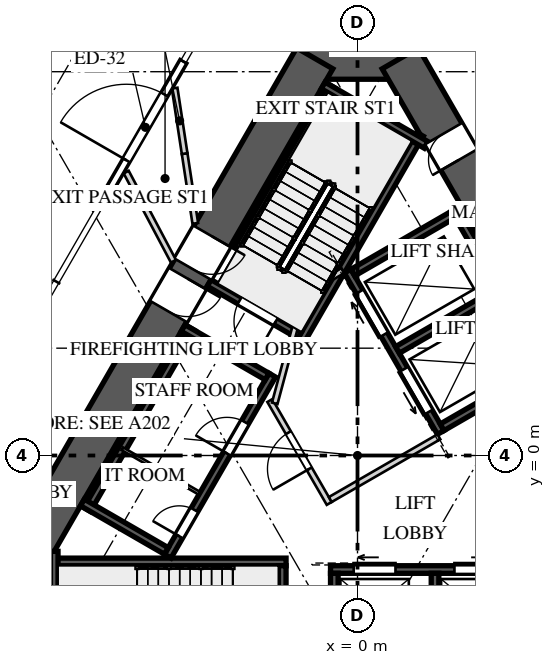
"""IFC4 building model, lengths in metres.
Left out: names, types, materials, properties, quantities, classifications, styles, units other than length and angle.
Written with IfcOpenShell. Run it as: python <this file> out.ifc"""

import sys

from ifc_helpers import new_model, si_unit, direction, frame, frame_2d, origin, place, context, subcontext, project, spatial, rectangle, extrude, element, fill, save


model = new_model("IFC4")
c1 = context("Model", 3, precision=1e-05, world=origin(), true_north=direction((0.0, 1.0)))
c2 = subcontext(c1, "Body", "Model", "MODEL_VIEW")
j1 = project(units=[si_unit("LENGTHUNIT", "METRE"), si_unit("PLANEANGLEUNIT", "RADIAN")], contexts=[c1])
p1 = place(None, origin())
s1 = spatial("IfcSite", under=j1, at=p1, CompositionType="ELEMENT")
p2 = place(p1, origin())
s2 = spatial("IfcBuilding", under=s1, at=p2, CompositionType="ELEMENT")
p3 = place(p2, origin())
s3 = spatial("IfcBuildingStorey", under=s2, at=p3, CompositionType="ELEMENT", Elevation=0.0)
p4 = place(p3, frame((1.443, 10.45, 0.0), z_axis=(0.0, 0.0, 1.0), x_axis=(-1.0, 0.0, 0.0)))
e1 = element("IfcWall", 1, at=p4, inside=s3, PredefinedType="SHEAR", context=c2, shape_type="SweptSolid", body=[
    extrude(rectangle(XDim=2.887, YDim=1.1, at=frame_2d((1.443, 0.0))), origin(), (0.0, 0.0, 1.0), 10.0),
])
p5 = place(p3, frame((-1.126, 10.45, 0.0), z_axis=(0.0, 0.0, 1.0), x_axis=(-0.500001757713, -0.866024388966, 0.0)))
e2 = element("IfcWall", 2, at=p5, inside=s3, PredefinedType="SHEAR", context=c2, shape_type="SweptSolid", body=[
    extrude(rectangle(XDim=16.974, YDim=1.1, at=frame_2d((8.487, 0.0))), origin(), (0.0, 0.0, 1.0), 10.0),
])
p6 = place(p5, frame((5.407, 0.0, 0.0)))
e3 = element("IfcOpeningElement", 3, at=p6, cuts=e2, PredefinedType="OPENING", context=c2, shape_type="SweptSolid", body=[
    extrude(rectangle(XDim=1.0, YDim=2.4, at=frame_2d((0.5, 1.2))), frame((0.0, 0.56, 0.0), z_axis=(0.0, -1.0, 0.0), x_axis=(1.0, 0.0, 0.0)), (0.0, 0.0, 1.0), 1.12),
])
p7 = place(p5, frame((6.692, 0.0, 0.0)))
e4 = element("IfcOpeningElement", 4, at=p7, cuts=e2, PredefinedType="OPENING", context=c2, shape_type="SweptSolid", body=[
    extrude(rectangle(XDim=1.0, YDim=2.4, at=frame_2d((0.5, 1.2))), frame((0.0, 0.56, 0.0), z_axis=(0.0, -1.0, 0.0), x_axis=(1.0, 0.0, 0.0)), (0.0, 0.0, 1.0), 1.12),
])
p8 = place(p3, frame((9.613, -4.25, 0.0), z_axis=(0.0, 0.0, 1.0), x_axis=(-0.500001757713, 0.866024388966, 0.0)))
e5 = element("IfcWall", 5, at=p8, inside=s3, PredefinedType="SHEAR", context=c2, shape_type="SweptSolid", body=[
    extrude(rectangle(XDim=16.974, YDim=1.1, at=frame_2d((8.487, 0.0))), origin(), (0.0, 0.0, 1.0), 10.0),
])
p9 = place(p8, frame((5.407, 0.0, 0.0)))
e6 = element("IfcOpeningElement", 6, at=p9, cuts=e5, PredefinedType="OPENING", context=c2, shape_type="SweptSolid", body=[
    extrude(rectangle(XDim=1.0, YDim=2.4, at=frame_2d((0.5, 1.2))), frame((0.0, 0.56, 0.0), z_axis=(0.0, -1.0, 0.0), x_axis=(1.0, 0.0, 0.0)), (0.0, 0.0, 1.0), 1.12),
])
p10 = place(p8, frame((6.762, 0.0, 0.0)))
e7 = element("IfcOpeningElement", 7, at=p10, cuts=e5, PredefinedType="OPENING", context=c2, shape_type="SweptSolid", body=[
    extrude(rectangle(XDim=1.0, YDim=2.4, at=frame_2d((0.5, 1.2))), frame((0.0, 0.56, 0.0), z_axis=(0.0, -1.0, 0.0), x_axis=(1.0, 0.0, 0.0)), (0.0, 0.0, 1.0), 1.12),
])
p11 = place(p8, frame((13.889, 0.0, 0.0)))
e8 = element("IfcOpeningElement", 8, at=p11, cuts=e5, PredefinedType="OPENING", context=c2, shape_type="SweptSolid", body=[
    extrude(rectangle(XDim=0.8, YDim=2.1, at=frame_2d((0.4, 1.05))), frame((0.0, 0.56, 0.0), z_axis=(0.0, -1.0, 0.0), x_axis=(1.0, 0.0, 0.0)), (0.0, 0.0, 1.0), 1.12),
])
p12 = place(p3, frame((-6.58, 6.902, 0.0), z_axis=(0.0, 0.0, 1.0), x_axis=(0.49999894854, 0.866026010844, 0.0)))
e9 = element("IfcWall", 9, at=p12, inside=s3, PredefinedType="STANDARD", context=c2, shape_type="SweptSolid", body=[
    extrude(rectangle(XDim=4.0, YDim=0.2, at=frame_2d((2.0, 0.0))), origin(), (0.0, 0.0, 1.0), 4.0),
])
p13 = place(p12, frame((1.0, 0.0, 0.0)))
e10 = element("IfcOpeningElement", 10, at=p13, cuts=e9, PredefinedType="OPENING", context=c2, shape_type="SweptSolid", body=[
    extrude(rectangle(XDim=2.0, YDim=2.6, at=frame_2d((1.0, 1.3))), frame((0.0, 0.11, 0.0), z_axis=(0.0, -1.0, 0.0), x_axis=(1.0, 0.0, 0.0)), (0.0, 0.0, 1.0), 0.22),
])
p14 = place(p3, frame((-0.68, 9.722, 0.0), z_axis=(0.0, 0.0, 1.0), x_axis=(-0.499974350878, -0.866040211805, 0.0)))
e11 = element("IfcWall", 11, at=p14, inside=s3, PredefinedType="SOLIDWALL", context=c2, shape_type="SweptSolid", body=[
    extrude(rectangle(XDim=4.95, YDim=0.2, at=frame_2d((2.475, 0.0))), origin(), (0.0, 0.0, 1.0), 9.65),
])
p15 = place(p3, frame((1.646, 8.45, 0.0), z_axis=(0.0, 0.0, 1.0), x_axis=(-0.500006002103, -0.866021938441, 0.0)))
e12 = element("IfcWall", 12, at=p15, inside=s3, PredefinedType="SOLIDWALL", context=c2, shape_type="SweptSolid", body=[
    extrude(rectangle(XDim=6.261, YDim=0.2, at=frame_2d((3.13, 0.0))), origin(), (0.0, 0.0, 1.0), 9.65),
])
p16 = place(p3, frame((1.806, 8.172, 0.0), z_axis=(0.0, 0.0, 1.0), x_axis=(-0.866054327916, 0.499949898588, 0.0)))
e13 = element("IfcWall", 13, at=p16, inside=s3, PredefinedType="SOLIDWALL", context=c2, shape_type="SweptSolid", body=[
    extrude(rectangle(XDim=3.128, YDim=0.2, at=frame_2d((1.564, 0.0))), origin(), (0.0, 0.0, 1.0), 9.65),
])
p17 = place(p3, frame((-1.521, 3.165, 0.0), z_axis=(0.0, 0.0, 1.0), x_axis=(-0.866027397988, 0.499996545922, 0.0)))
e14 = element("IfcWall", 14, at=p17, inside=s3, PredefinedType="SOLIDWALL", context=c2, shape_type="SweptSolid", body=[
    extrude(rectangle(XDim=2.75, YDim=0.2, at=frame_2d((1.375, 0.0))), origin(), (0.0, 0.0, 1.0), 9.65),
])
p18 = place(p17, frame((0.725, 0.0, 0.0)))
e15 = element("IfcOpeningElement", 15, at=p18, cuts=e14, PredefinedType="OPENING", context=c2, shape_type="SweptSolid", body=[
    extrude(rectangle(XDim=1.1, YDim=2.4, at=frame_2d((0.55, 1.2))), frame((0.0, 0.11, 0.0), z_axis=(0.0, -1.0, 0.0), x_axis=(1.0, 0.0, 0.0)), (0.0, 0.0, 1.0), 0.22),
])
p19 = place(p3, frame((-8.141, -2.8, 0.0), z_axis=(0.0, 0.0, 1.0), x_axis=(1.0, 0.0, 0.0)))
e16 = element("IfcWall", 16, at=p19, inside=s3, PredefinedType="SOLIDWALL", context=c2, shape_type="SweptSolid", body=[
    extrude(rectangle(XDim=6.261, YDim=0.2, at=frame_2d((3.13, 0.0))), origin(), (0.0, 0.0, 1.0), 9.65),
])
p20 = place(p3, frame((-7.98, -2.522, 0.0), z_axis=(0.0, 0.0, 1.0), x_axis=(0.0, -1.0, 0.0)))
e17 = element("IfcWall", 17, at=p20, inside=s3, PredefinedType="SOLIDWALL", context=c2, shape_type="SweptSolid", body=[
    extrude(rectangle(XDim=3.128, YDim=0.2, at=frame_2d((1.564, 0.0))), origin(), (0.0, 0.0, 1.0), 9.65),
])
p21 = place(p3, frame((-1.98, -2.9, 0.0), z_axis=(0.0, 0.0, 1.0), x_axis=(0.0, -1.0, 0.0)))
e18 = element("IfcWall", 18, at=p21, inside=s3, PredefinedType="SOLIDWALL", context=c2, shape_type="SweptSolid", body=[
    extrude(rectangle(XDim=2.75, YDim=0.2, at=frame_2d((1.375, 0.0))), origin(), (0.0, 0.0, 1.0), 9.65),
])
p22 = place(p21, frame((0.725, 0.0, 0.0)))
e19 = element("IfcOpeningElement", 19, at=p22, cuts=e18, PredefinedType="OPENING", context=c2, shape_type="SweptSolid", body=[
    extrude(rectangle(XDim=1.1, YDim=2.4, at=frame_2d((0.55, 1.2))), frame((0.0, 0.11, 0.0), z_axis=(0.0, -1.0, 0.0), x_axis=(1.0, 0.0, 0.0)), (0.0, 0.0, 1.0), 0.22),
])
p23 = place(p3, frame((-4.993, -2.648, 0.0), z_axis=(0.0, 0.0, 1.0), x_axis=(0.499996545922, 0.866027397988, 0.0)))
e20 = element("IfcWall", 20, at=p23, inside=s3, PredefinedType="SOLIDWALL", context=c2, shape_type="SweptSolid", body=[
    extrude(rectangle(XDim=5.5, YDim=0.2, at=frame_2d((2.75, 0.0))), origin(), (0.0, 0.0, 1.0), 9.65),
])
p24 = place(p23, frame((3.12, 0.0, 0.0)))
e21 = element("IfcOpeningElement", 21, at=p24, cuts=e20, PredefinedType="OPENING", context=c2, shape_type="SweptSolid", body=[
    extrude(rectangle(XDim=0.95, YDim=2.4, at=frame_2d((0.475, 1.2))), frame((0.0, 0.11, 0.0), z_axis=(0.0, -1.0, 0.0), x_axis=(1.0, 0.0, 0.0)), (0.0, 0.0, 1.0), 0.22),
])
p25 = place(p23, frame((0.605, 0.0, 0.0)))
e22 = element("IfcOpeningElement", 22, at=p25, cuts=e20, PredefinedType="OPENING", context=c2, shape_type="SweptSolid", body=[
    extrude(rectangle(XDim=0.8, YDim=2.1, at=frame_2d((0.4, 1.05))), frame((0.0, 0.11, 0.0), z_axis=(0.0, -1.0, 0.0), x_axis=(1.0, 0.0, 0.0)), (0.0, 0.0, 1.0), 0.22),
])
p26 = place(p3, frame((-4.365, 3.34, 0.0), z_axis=(0.0, 0.0, 1.0), x_axis=(-0.499996545922, -0.866027397988, 0.0)))
e23 = element("IfcWall", 23, at=p26, inside=s3, PredefinedType="SOLIDWALL", context=c2, shape_type="SweptSolid", body=[
    extrude(rectangle(XDim=5.5, YDim=0.2, at=frame_2d((2.75, 0.0))), origin(), (0.0, 0.0, 1.0), 9.65),
])
for number, where, z_axis, x_axis in (
    (24, (-2.38, 2.078, 0.0), (0.0, 0.0, 1.0), (-0.866, 0.5, 0.0)),
    (25, (-5.03, -2.512, 0.0), (0.0, 0.0, 1.0), (-0.866, 0.5, 0.0)),
):
    element("IfcWall", number, at=place(p3, frame(where, z_axis=z_axis, x_axis=x_axis)), inside=s3, PredefinedType="SOLIDWALL", context=c2, shape_type="SweptSolid", body=[
        extrude(rectangle(XDim=2.55, YDim=0.2, at=frame_2d((1.275, 0.0))), origin(), (0.0, 0.0, 1.0), 9.65),
    ])
p27 = place(p3, frame((-4.155, -0.996, 0.0), z_axis=(0.0, 0.0, 1.0), x_axis=(-0.866016039709, 0.500016218704, 0.0)))
e26 = element("IfcWall", 26, at=p27, inside=s3, PredefinedType="PARTITIONING", context=c2, shape_type="SweptSolid", body=[
    extrude(rectangle(XDim=2.35, YDim=0.08, at=frame_2d((1.175, 0.0))), origin(), (0.0, 0.0, 1.0), 9.65),
])
p28 = place(p3, frame((-0.71, -3.0, 0.0), z_axis=(0.0, 0.0, 1.0), x_axis=(1.0, 0.0, 0.0)))
e27 = element("IfcWall", 27, at=p28, inside=s3, PredefinedType="SOLIDWALL", context=c2, shape_type="SweptSolid", body=[
    extrude(rectangle(XDim=5.5, YDim=0.2, at=frame_2d((2.75, 0.0))), origin(), (0.0, 0.0, 1.0), 9.65),
])
p29 = place(p28, frame((0.61, 0.0, 0.0)))
e28 = element("IfcOpeningElement", 28, at=p29, cuts=e27, PredefinedType="OPENING", context=c2, shape_type="SweptSolid", body=[
    extrude(rectangle(XDim=1.1, YDim=2.1, at=frame_2d((0.55, 1.05))), frame((0.0, 0.11, 0.0), z_axis=(0.0, -1.0, 0.0), x_axis=(1.0, 0.0, 0.0)), (0.0, 0.0, 1.0), 0.22),
])
p30 = place(p28, frame((3.26, 0.0, 0.0)))
e29 = element("IfcOpeningElement", 29, at=p30, cuts=e27, PredefinedType="OPENING", context=c2, shape_type="SweptSolid", body=[
    extrude(rectangle(XDim=1.1, YDim=2.1, at=frame_2d((0.55, 1.05))), frame((0.0, 0.11, 0.0), z_axis=(0.0, -1.0, 0.0), x_axis=(1.0, 0.0, 0.0)), (0.0, 0.0, 1.0), 0.22),
])
for number, where, z_axis, x_axis in (
    (30, (-0.61, -3.1, 0.0), (0.0, 0.0, 1.0), (0.0, -1.0, 0.0)),
    (31, (2.04, -3.1, 0.0), (0.0, 0.0, 1.0), (0.0, -1.0, 0.0)),
):
    element("IfcWall", number, at=place(p3, frame(where, z_axis=z_axis, x_axis=x_axis)), inside=s3, PredefinedType="SOLIDWALL", context=c2, shape_type="SweptSolid", body=[
        extrude(rectangle(XDim=2.55, YDim=0.2, at=frame_2d((1.275, 0.0))), origin(), (0.0, 0.0, 1.0), 9.65),
    ])
p31 = place(p3, frame((2.19, 0.606, 0.0), z_axis=(0.0, 0.0, 1.0), x_axis=(-0.500002801628, 0.866023786258, 0.0)))
e32 = element("IfcWall", 32, at=p31, inside=s3, PredefinedType="SOLIDWALL", context=c2, shape_type="SweptSolid", body=[
    extrude(rectangle(XDim=4.9, YDim=0.2, at=frame_2d((2.45, 0.0))), origin(), (0.0, 0.0, 1.0), 9.65),
])
p32 = place(p31, frame((0.625, 0.0, 0.0)))
e33 = element("IfcOpeningElement", 33, at=p32, cuts=e32, PredefinedType="OPENING", context=c2, shape_type="SweptSolid", body=[
    extrude(rectangle(XDim=1.3, YDim=2.1, at=frame_2d((0.65, 1.05))), frame((0.0, 0.11, 0.0), z_axis=(0.0, -1.0, 0.0), x_axis=(1.0, 0.0, 0.0)), (0.0, 0.0, 1.0), 0.22),
])
p33 = place(p31, frame((2.975, 0.0, 0.0)))
e34 = element("IfcOpeningElement", 34, at=p33, cuts=e32, PredefinedType="OPENING", context=c2, shape_type="SweptSolid", body=[
    extrude(rectangle(XDim=1.3, YDim=2.1, at=frame_2d((0.65, 1.05))), frame((0.0, 0.11, 0.0), z_axis=(0.0, -1.0, 0.0), x_axis=(1.0, 0.0, 0.0)), (0.0, 0.0, 1.0), 0.22),
])
p34 = place(p3, frame((5.005, 2.231, 0.0), z_axis=(0.0, 0.0, 1.0), x_axis=(-0.500002801628, 0.866023786258, 0.0)))
e35 = element("IfcWall", 35, at=p34, inside=s3, PredefinedType="SOLIDWALL", context=c2, shape_type="SweptSolid", body=[
    extrude(rectangle(XDim=4.9, YDim=0.2, at=frame_2d((2.45, 0.0))), origin(), (0.0, 0.0, 1.0), 9.65),
])
p35 = place(p3, frame((2.227, 0.743, 0.0), z_axis=(0.0, 0.0, 1.0), x_axis=(0.866014461049, 0.500018952895, 0.0)))
e36 = element("IfcWall", 36, at=p35, inside=s3, PredefinedType="SOLIDWALL", context=c2, shape_type="SweptSolid", body=[
    extrude(rectangle(XDim=3.35, YDim=0.2, at=frame_2d((1.675, 0.0))), origin(), (0.0, 0.0, 1.0), 9.65),
])
p36 = place(p3, frame((1.052, 2.778, 0.0), z_axis=(0.0, 0.0, 1.0), x_axis=(0.866032680314, 0.499987396469, 0.0)))
e37 = element("IfcWall", 37, at=p36, inside=s3, PredefinedType="SOLIDWALL", context=c2, shape_type="SweptSolid", body=[
    extrude(rectangle(XDim=3.35, YDim=0.2, at=frame_2d((1.675, 0.0))), origin(), (0.0, 0.0, 1.0), 9.65),
])
p37 = place(p3, frame((-0.123, 4.813, 0.0), z_axis=(0.0, 0.0, 1.0), x_axis=(0.866014461049, 0.500018952895, 0.0)))
e38 = element("IfcWall", 38, at=p37, inside=s3, PredefinedType="SOLIDWALL", context=c2, shape_type="SweptSolid", body=[
    extrude(rectangle(XDim=3.35, YDim=0.2, at=frame_2d((1.675, 0.0))), origin(), (0.0, 0.0, 1.0), 9.65),
])
p38 = place(p3, frame((-4.268, 6.107, 0.0), z_axis=(0.0, 0.0, 1.0), x_axis=(-0.151020047148, 0.988530700261, 0.0)))
e39 = element("IfcWall", 39, at=p38, inside=s3, PredefinedType="PARTITIONING", context=c2, shape_type="SweptSolid", body=[
    extrude(rectangle(XDim=1.857, YDim=0.15, at=frame_2d((0.929, 0.0))), origin(), (0.0, 0.0, 1.0), 9.65),
])
p39 = place(p3, frame((-4.549, 7.944, 0.0), z_axis=(0.0, 0.0, 1.0), x_axis=(-0.151067241463, 0.988523489127, 0.0)))
e40 = element("IfcWall", 40, at=p39, inside=s3, PredefinedType="PARTITIONING", context=c2, shape_type="SweptSolid", body=[
    extrude(rectangle(XDim=1.742, YDim=0.15, at=frame_2d((0.871, 0.0))), origin(), (0.0, 0.0, 1.0), 8.75),
])
p40 = place(p3, frame((-4.843, 5.111, 0.0), z_axis=(0.0, 0.0, 1.0), x_axis=(-0.468272102551, 0.883584312883, 0.0)))
e41 = element("IfcWall", 41, at=p40, inside=s3, PredefinedType="PARTITIONING", context=c2, shape_type="SweptSolid", body=[
    extrude(rectangle(XDim=2.655, YDim=0.15, at=frame_2d((1.328, 0.0))), origin(), (0.0, 0.0, 1.0), 9.65),
])
p41 = place(p3, frame((-0.744, -1.261, 0.0), z_axis=(0.0, 0.0, 1.0), x_axis=(-0.500004234368, 0.866022959057, 0.0)))
e42 = element("IfcWall", 42, at=p41, inside=s3, PredefinedType="PARTITIONING", context=c2, shape_type="SweptSolid", body=[
    extrude(rectangle(XDim=3.125, YDim=0.15, at=frame_2d((1.562, 0.0))), origin(), (0.0, 0.0, 1.0), 9.65),
])
p42 = place(p41, frame((1.05, 0.0, 0.0)))
e43 = element("IfcOpeningElement", 43, at=p42, cuts=e42, PredefinedType="OPENING", context=c2, shape_type="SweptSolid", body=[
    extrude(rectangle(XDim=1.1, YDim=2.4, at=frame_2d((0.55, 1.2))), frame((0.0, 0.085, 0.0), z_axis=(0.0, -1.0, 0.0), x_axis=(1.0, 0.0, 0.0)), (0.0, 0.0, 1.0), 0.17),
])
p43 = place(p3, frame((-0.717, -1.159, 0.0), z_axis=(0.0, 0.0, 1.0), x_axis=(0.866008176907, 0.50002983664, 0.0)))
e44 = element("IfcWall", 44, at=p43, inside=s3, PredefinedType="PARTITIONING", context=c2, shape_type="SweptSolid", body=[
    extrude(rectangle(XDim=3.3, YDim=0.15, at=frame_2d((1.65, 0.0))), origin(), (0.0, 0.0, 1.0), 9.65),
])
p44 = place(p3, frame((-2.178, 1.372, 0.0), z_axis=(0.0, 0.0, 1.0), x_axis=(0.258808958833, 0.96592852884, 0.0)))
e45 = element("IfcWall", 45, at=p44, inside=s3, PredefinedType="PARTITIONING", context=c2, shape_type="SweptSolid", body=[
    extrude(rectangle(XDim=2.903, YDim=0.15, at=frame_2d((1.451, 0.0))), origin(), (0.0, 0.0, 1.0), 9.65),
])
p45 = place(p3, frame((-1.51, 4.215, 0.0), z_axis=(0.0, 0.0, 1.0), x_axis=(0.866085525409, 0.49989585183, 0.0)))
e46 = element("IfcWall", 46, at=p45, inside=s3, PredefinedType="PARTITIONING", context=c2, shape_type="SweptSolid", body=[
    extrude(rectangle(XDim=1.3, YDim=0.15, at=frame_2d((0.65, 0.0))), origin(), (0.0, 0.0, 1.0), 9.65),
])
p46 = place(p13, origin())
e47 = element("IfcDoor", 47, at=p46, inside=s3, OperationType="DOUBLE_DOOR_SINGLE_SWING", PredefinedType="DOOR", context=c2, shape_type="SweptSolid", body=[
    extrude(rectangle(XDim=2.0, YDim=2.6, at=frame_2d((1.0, 1.3))), frame((0.0, 0.025, 0.0), z_axis=(0.0, -1.0, 0.0), x_axis=(1.0, 0.0, 0.0)), (0.0, 0.0, 1.0), 0.05),
])
fill(e10, e47)
p47 = place(p18, origin())
e48 = element("IfcDoor", 48, at=p47, inside=s3, OperationType="SINGLE_SWING_RIGHT", PredefinedType="DOOR", context=c2, shape_type="SweptSolid", body=[
    extrude(rectangle(XDim=1.1, YDim=2.4, at=frame_2d((0.55, 1.2))), frame((0.0, 0.025, 0.0), z_axis=(0.0, -1.0, 0.0), x_axis=(1.0, 0.0, 0.0)), (0.0, 0.0, 1.0), 0.05),
])
fill(e15, e48)
p48 = place(p24, origin())
e49 = element("IfcDoor", 49, at=p48, inside=s3, OperationType="SINGLE_SWING_LEFT", PredefinedType="DOOR", context=c2, shape_type="SweptSolid", body=[
    extrude(rectangle(XDim=0.95, YDim=2.4, at=frame_2d((0.475, 1.2))), frame((0.0, 0.025, 0.0), z_axis=(0.0, -1.0, 0.0), x_axis=(1.0, 0.0, 0.0)), (0.0, 0.0, 1.0), 0.05),
])
fill(e21, e49)
p49 = place(p25, origin())
e50 = element("IfcDoor", 50, at=p49, inside=s3, OperationType="SINGLE_SWING_RIGHT", PredefinedType="DOOR", context=c2, shape_type="SweptSolid", body=[
    extrude(rectangle(XDim=0.8, YDim=2.1, at=frame_2d((0.4, 1.05))), frame((0.0, 0.025, 0.0), z_axis=(0.0, -1.0, 0.0), x_axis=(1.0, 0.0, 0.0)), (0.0, 0.0, 1.0), 0.05),
])
fill(e22, e50)
p50 = place(p29, origin())
e51 = element("IfcDoor", 51, at=p50, inside=s3, OperationType="SLIDING_TO_LEFT", PredefinedType="DOOR", context=c2, shape_type="SweptSolid", body=[
    extrude(rectangle(XDim=1.1, YDim=2.1, at=frame_2d((0.55, 1.05))), frame((0.0, 0.025, 0.0), z_axis=(0.0, -1.0, 0.0), x_axis=(1.0, 0.0, 0.0)), (0.0, 0.0, 1.0), 0.05),
])
fill(e28, e51)
p51 = place(p30, origin())
e52 = element("IfcDoor", 52, at=p51, inside=s3, OperationType="SLIDING_TO_RIGHT", PredefinedType="DOOR", context=c2, shape_type="SweptSolid", body=[
    extrude(rectangle(XDim=1.1, YDim=2.1, at=frame_2d((0.55, 1.05))), frame((0.0, 0.025, 0.0), z_axis=(0.0, -1.0, 0.0), x_axis=(1.0, 0.0, 0.0)), (0.0, 0.0, 1.0), 0.05),
])
fill(e29, e52)
p52 = place(p32, origin())
e53 = element("IfcDoor", 53, at=p52, inside=s3, OperationType="SLIDING_TO_LEFT", PredefinedType="DOOR", context=c2, shape_type="SweptSolid", body=[
    extrude(rectangle(XDim=1.3, YDim=2.1, at=frame_2d((0.65, 1.05))), frame((0.0, 0.025, 0.0), z_axis=(0.0, -1.0, 0.0), x_axis=(1.0, 0.0, 0.0)), (0.0, 0.0, 1.0), 0.05),
])
fill(e33, e53)
p53 = place(p33, origin())
e54 = element("IfcDoor", 54, at=p53, inside=s3, OperationType="SLIDING_TO_RIGHT", PredefinedType="DOOR", context=c2, shape_type="SweptSolid", body=[
    extrude(rectangle(XDim=1.3, YDim=2.1, at=frame_2d((0.65, 1.05))), frame((0.0, 0.025, 0.0), z_axis=(0.0, -1.0, 0.0), x_axis=(1.0, 0.0, 0.0)), (0.0, 0.0, 1.0), 0.05),
])
fill(e34, e54)
p54 = place(p6, origin())
e55 = element("IfcDoor", 55, at=p54, inside=s3, OperationType="SINGLE_SWING_LEFT", PredefinedType="DOOR", context=c2, shape_type="SweptSolid", body=[
    extrude(rectangle(XDim=1.0, YDim=2.4, at=frame_2d((0.5, 1.2))), frame((0.0, 0.025, 0.0), z_axis=(0.0, -1.0, 0.0), x_axis=(1.0, 0.0, 0.0)), (0.0, 0.0, 1.0), 0.05),
])
fill(e3, e55)
p55 = place(p42, origin())
e56 = element("IfcDoor", 56, at=p55, inside=s3, OperationType="SINGLE_SWING_RIGHT", PredefinedType="DOOR", context=c2, shape_type="SweptSolid", body=[
    extrude(rectangle(XDim=1.1, YDim=2.4, at=frame_2d((0.55, 1.2))), frame((0.0, 0.025, 0.0), z_axis=(0.0, -1.0, 0.0), x_axis=(1.0, 0.0, 0.0)), (0.0, 0.0, 1.0), 0.05),
])
fill(e43, e56)
p56 = place(p7, origin())
e57 = element("IfcDoor", 57, at=p56, inside=s3, OperationType="SINGLE_SWING_LEFT", PredefinedType="DOOR", context=c2, shape_type="SweptSolid", body=[
    extrude(rectangle(XDim=1.0, YDim=2.4, at=frame_2d((0.5, 1.2))), frame((0.0, 0.025, 0.0), z_axis=(0.0, -1.0, 0.0), x_axis=(1.0, 0.0, 0.0)), (0.0, 0.0, 1.0), 0.05),
])
fill(e4, e57)
p57 = place(p11, origin())
e58 = element("IfcDoor", 58, at=p57, inside=s3, OperationType="SINGLE_SWING_LEFT", PredefinedType="DOOR", context=c2, shape_type="SweptSolid", body=[
    extrude(rectangle(XDim=0.8, YDim=2.1, at=frame_2d((0.4, 1.05))), frame((0.0, 0.025, 0.0), z_axis=(0.0, -1.0, 0.0), x_axis=(1.0, 0.0, 0.0)), (0.0, 0.0, 1.0), 0.05),
])
fill(e8, e58)
save(model, sys.argv[1])
